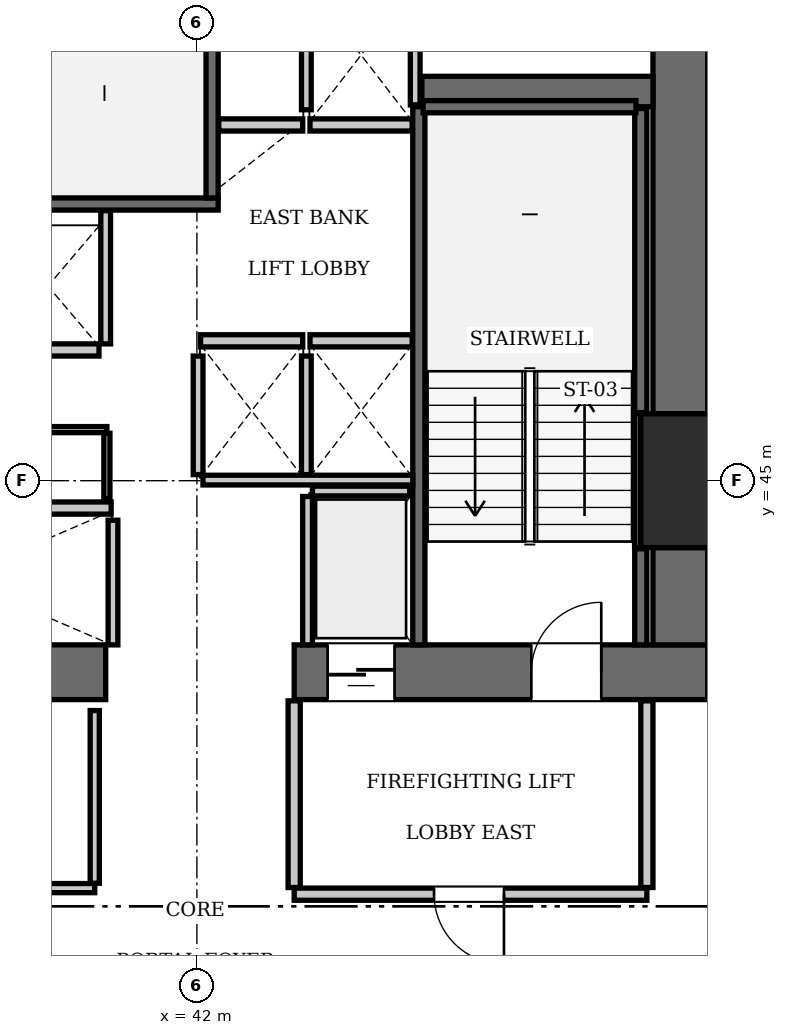
"""IFC4 building model, lengths in metres.
Left out: names, types, materials, properties, quantities, classifications, styles, units other than length and angle.
Written with IfcOpenShell. Run it as: python <this file> out.ifc"""

import sys

from ifc_helpers import new_model, si_unit, direction, frame, frame_2d, origin, origin_2d, place, context, subcontext, project, spatial, rectangle, extrude, element, fill, save


model = new_model("IFC4")
c1 = context("Model", 3, precision=1e-05, world=origin(), true_north=direction((0.0, 1.0)))
c2 = subcontext(c1, "Body", "Model", "MODEL_VIEW")
j1 = project(units=[si_unit("LENGTHUNIT", "METRE"), si_unit("PLANEANGLEUNIT", "RADIAN")], contexts=[c1])
p1 = place(None, origin())
s1 = spatial("IfcSite", under=j1, at=p1, CompositionType="ELEMENT")
p2 = place(p1, origin())
s2 = spatial("IfcBuilding", under=s1, at=p2, CompositionType="ELEMENT")
p3 = place(p2, frame((0.0, 0.0, 30.8)))
s3 = spatial("IfcBuildingStorey", under=s2, at=p3, CompositionType="ELEMENT", Elevation=30.8)
p4 = place(p3, frame((50.4, 45.0, 0.0), z_axis=(0.0, 0.0, 1.0), x_axis=(1.0, 0.0, 0.0)))
e1 = element("IfcColumn", 1, at=p4, inside=s3, PredefinedType="COLUMN", context=c2, shape_type="SweptSolid", body=[
    extrude(rectangle(XDim=2.2, YDim=2.2, at=origin_2d()), origin(), (0.0, 0.0, 1.0), 3.85),
])
p5 = place(p3, frame((35.1, 41.85, 0.0), z_axis=(0.0, 0.0, 1.0), x_axis=(1.0, 0.0, 0.0)))
e2 = element("IfcWall", 2, at=p5, inside=s3, PredefinedType="SHEAR", context=c2, shape_type="SweptSolid", body=[
    extrude(rectangle(XDim=5.4, YDim=0.9, at=frame_2d((2.7, 0.0))), origin(), (0.0, 0.0, 1.0), 3.85),
])
p6 = place(p3, frame((43.6, 41.85, 0.0), z_axis=(0.0, 0.0, 1.0), x_axis=(1.0, 0.0, 0.0)))
e3 = element("IfcWall", 3, at=p6, inside=s3, PredefinedType="SHEAR", context=c2, shape_type="SweptSolid", body=[
    extrude(rectangle(XDim=6.8, YDim=0.9, at=frame_2d((3.4, 0.0))), origin(), (0.0, 0.0, 1.0), 3.85),
])
p7 = place(p6, frame((3.9, 0.0, 0.0)))
e4 = element("IfcOpeningElement", 4, at=p7, cuts=e3, PredefinedType="OPENING", context=c2, shape_type="SweptSolid", body=[
    extrude(rectangle(XDim=1.15, YDim=2.15, at=frame_2d((0.575, 1.075))), frame((0.0, 0.46, 0.0), z_axis=(0.0, -1.0, 0.0), x_axis=(1.0, 0.0, 0.0)), (0.0, 0.0, 1.0), 0.92),
])
p8 = place(p6, frame((0.55, 0.0, 0.0)))
e5 = element("IfcOpeningElement", 5, at=p8, cuts=e3, PredefinedType="OPENING", context=c2, shape_type="SweptSolid", body=[
    extrude(rectangle(XDim=1.1, YDim=2.2, at=frame_2d((0.55, 1.1))), frame((0.0, 0.46, 0.0), z_axis=(0.0, -1.0, 0.0), x_axis=(1.0, 0.0, 0.0)), (0.0, 0.0, 1.0), 0.92),
])
p9 = place(p3, frame((49.95, 42.3, 0.0), z_axis=(0.0, 0.0, 1.0), x_axis=(0.0, 1.0, 0.0)))
e6 = element("IfcWall", 6, at=p9, inside=s3, PredefinedType="SHEAR", context=c2, shape_type="SweptSolid", body=[
    extrude(rectangle(XDim=1.6, YDim=0.9, at=frame_2d((0.8, 0.0))), origin(), (0.0, 0.0, 1.0), 3.85),
])
p10 = place(p3, frame((49.95, 46.1, 0.0), z_axis=(0.0, 0.0, 1.0), x_axis=(0.0, 1.0, 0.0)))
e7 = element("IfcWall", 7, at=p10, inside=s3, PredefinedType="SHEAR", context=c2, shape_type="SweptSolid", body=[
    extrude(rectangle(XDim=7.0, YDim=0.9, at=frame_2d((3.5, 0.0))), origin(), (0.0, 0.0, 1.0), 3.85),
])
p11 = place(p3, frame((45.7, 51.4, 0.0), z_axis=(0.0, 0.0, 1.0), x_axis=(1.0, 0.0, 0.0)))
e8 = element("IfcWall", 8, at=p11, inside=s3, PredefinedType="SHEAR", context=c2, shape_type="SweptSolid", body=[
    extrude(rectangle(XDim=3.8, YDim=0.5, at=frame_2d((1.9, 0.0))), origin(), (0.0, 0.0, 1.0), 3.85),
])
p12 = place(p3, frame((33.25, 49.55, 0.0), z_axis=(0.0, 0.0, 1.0), x_axis=(1.0, 0.0, 0.0)))
e9 = element("IfcWall", 9, at=p12, inside=s3, PredefinedType="SOLIDWALL", context=c2, shape_type="SweptSolid", body=[
    extrude(rectangle(XDim=9.1, YDim=0.2, at=frame_2d((4.55, 0.0))), origin(), (0.0, 0.0, 1.0), 3.61),
])
p13 = place(p3, frame((42.25, 49.65, 0.0), z_axis=(0.0, 0.0, 1.0), x_axis=(0.0, 1.0, 0.0)))
e10 = element("IfcWall", 10, at=p13, inside=s3, PredefinedType="SOLIDWALL", context=c2, shape_type="SweptSolid", body=[
    extrude(rectangle(XDim=3.45, YDim=0.2, at=frame_2d((1.725, 0.0))), origin(), (0.0, 0.0, 1.0), 3.61),
])
p14 = place(p3, frame((45.65, 42.3, 0.0), z_axis=(0.0, 0.0, 1.0), x_axis=(0.0, 1.0, 0.0)))
e11 = element("IfcWall", 11, at=p14, inside=s3, PredefinedType="SOLIDWALL", context=c2, shape_type="SweptSolid", body=[
    extrude(rectangle(XDim=8.85, YDim=0.2, at=frame_2d((4.425, 0.0))), origin(), (0.0, 0.0, 1.0), 3.61),
])
p15 = place(p3, frame((49.3, 42.3, 0.0), z_axis=(0.0, 0.0, 1.0), x_axis=(0.0, 1.0, 0.0)))
e12 = element("IfcWall", 12, at=p15, inside=s3, PredefinedType="SOLIDWALL", context=c2, shape_type="SweptSolid", body=[
    extrude(rectangle(XDim=1.58, YDim=0.2, at=frame_2d((0.79, 0.0))), origin(), (0.0, 0.0, 1.0), 3.61),
])
p16 = place(p3, frame((49.3, 46.12, 0.0), z_axis=(0.0, 0.0, 1.0), x_axis=(0.0, 1.0, 0.0)))
e13 = element("IfcWall", 13, at=p16, inside=s3, PredefinedType="SOLIDWALL", context=c2, shape_type="SweptSolid", body=[
    extrude(rectangle(XDim=5.0, YDim=0.2, at=frame_2d((2.5, 0.0))), origin(), (0.0, 0.0, 1.0), 3.61),
])
p17 = place(p3, frame((45.72, 51.15, 0.0), z_axis=(0.0, 0.0, 1.0), x_axis=(1.0, 0.0, 0.0)))
e14 = element("IfcWall", 14, at=p17, inside=s3, PredefinedType="SOLIDWALL", context=c2, shape_type="SweptSolid", body=[
    extrude(rectangle(XDim=3.5, YDim=0.2, at=frame_2d((1.75, 0.0))), origin(), (0.0, 0.0, 1.0), 3.61),
])
p18 = place(p3, frame((49.248, 43.9, 0.0), z_axis=(0.0, 0.0, 1.0), x_axis=(0.0, 1.0, 0.0)))
e15 = element("IfcWall", 15, at=p18, inside=s3, PredefinedType="SOLIDWALL", context=c2, shape_type="SweptSolid", body=[
    extrude(rectangle(XDim=2.2, YDim=0.1, at=frame_2d((1.1, 0.0))), origin(), (0.0, 0.0, 1.0), 3.61),
])
for number, where, z_axis, x_axis in (
    (16, (42.06, 47.3, 0.0), (0.0, 0.0, 1.0), (1.0, 0.0, 0.0)),
    (17, (43.86, 47.3, 0.0), (0.0, 0.0, 1.0), (1.0, 0.0, 0.0)),
):
    element("IfcWall", number, at=place(p3, frame(where, z_axis=z_axis, x_axis=x_axis)), inside=s3, PredefinedType="SOLIDWALL", context=c2, shape_type="SweptSolid", body=[
        extrude(rectangle(XDim=1.68, YDim=0.2, at=frame_2d((0.84, 0.0))), origin(), (0.0, 0.0, 1.0), 3.61),
    ])
p19 = place(p3, frame((42.36, 50.85, 0.0), z_axis=(0.0, 0.0, 1.0), x_axis=(1.0, 0.0, 0.0)))
e18 = element("IfcWall", 18, at=p19, inside=s3, PredefinedType="SOLIDWALL", context=c2, shape_type="SweptSolid", body=[
    extrude(rectangle(XDim=1.38, YDim=0.2, at=frame_2d((0.69, 0.0))), origin(), (0.0, 0.0, 1.0), 3.61),
])
p20 = place(p3, frame((43.86, 50.85, 0.0), z_axis=(0.0, 0.0, 1.0), x_axis=(1.0, 0.0, 0.0)))
e19 = element("IfcWall", 19, at=p20, inside=s3, PredefinedType="SOLIDWALL", context=c2, shape_type="SweptSolid", body=[
    extrude(rectangle(XDim=1.68, YDim=0.2, at=frame_2d((0.84, 0.0))), origin(), (0.0, 0.0, 1.0), 3.61),
])
p21 = place(p3, frame((38.91, 44.55, 0.0), z_axis=(0.0, 0.0, 1.0), x_axis=(1.0, 0.0, 0.0)))
e20 = element("IfcWall", 20, at=p21, inside=s3, PredefinedType="SOLIDWALL", context=c2, shape_type="SweptSolid", body=[
    extrude(rectangle(XDim=1.68, YDim=0.2, at=frame_2d((0.84, 0.0))), origin(), (0.0, 0.0, 1.0), 3.61),
])
p22 = place(p3, frame((38.71, 47.15, 0.0), z_axis=(0.0, 0.0, 1.0), x_axis=(1.0, 0.0, 0.0)))
e21 = element("IfcWall", 21, at=p22, inside=s3, PredefinedType="SOLIDWALL", context=c2, shape_type="SweptSolid", body=[
    extrude(rectangle(XDim=1.68, YDim=0.2, at=frame_2d((0.84, 0.0))), origin(), (0.0, 0.0, 1.0), 3.61),
])
p23 = place(p3, frame((43.9, 44.83, 0.0), z_axis=(0.0, 0.0, 1.0), x_axis=(1.0, 0.0, 0.0)))
e22 = element("IfcWall", 22, at=p23, inside=s3, PredefinedType="SOLIDWALL", context=c2, shape_type="SweptSolid", body=[
    extrude(rectangle(XDim=1.6, YDim=0.16, at=frame_2d((0.8, 0.0))), origin(), (0.0, 0.0, 1.0), 3.61),
])
p24 = place(p3, frame((43.82, 42.3, 0.0), z_axis=(0.0, 0.0, 1.0), x_axis=(0.0, 1.0, 0.0)))
e23 = element("IfcWall", 23, at=p24, inside=s3, PredefinedType="SOLIDWALL", context=c2, shape_type="SweptSolid", body=[
    extrude(rectangle(XDim=2.44, YDim=0.16, at=frame_2d((1.22, 0.0))), origin(), (0.0, 0.0, 1.0), 3.61),
])
for number, where, z_axis, x_axis in (
    (24, (42.02, 45.1, 0.0), (0.0, 0.0, 1.0), (0.0, 1.0, 0.0)),
    (25, (43.8, 45.1, 0.0), (0.0, 0.0, 1.0), (0.0, 1.0, 0.0)),
):
    element("IfcWall", number, at=place(p3, frame(where, z_axis=z_axis, x_axis=x_axis)), inside=s3, PredefinedType="SOLIDWALL", context=c2, shape_type="SweptSolid", body=[
        extrude(rectangle(XDim=1.95, YDim=0.16, at=frame_2d((0.975, 0.0))), origin(), (0.0, 0.0, 1.0), 3.61),
    ])
p25 = place(p3, frame((42.1, 45.01, 0.0), z_axis=(0.0, 0.0, 1.0), x_axis=(1.0, 0.0, 0.0)))
e26 = element("IfcWall", 26, at=p25, inside=s3, PredefinedType="SOLIDWALL", context=c2, shape_type="SweptSolid", body=[
    extrude(rectangle(XDim=3.45, YDim=0.16, at=frame_2d((1.725, 0.0))), origin(), (0.0, 0.0, 1.0), 3.61),
])
p26 = place(p3, frame((45.59, 51.18, 0.0), z_axis=(0.0, 0.0, 1.0), x_axis=(0.0, 1.0, 0.0)))
e27 = element("IfcWall", 27, at=p26, inside=s3, PredefinedType="SOLIDWALL", context=c2, shape_type="SweptSolid", body=[
    extrude(rectangle(XDim=1.92, YDim=0.16, at=frame_2d((0.96, 0.0))), origin(), (0.0, 0.0, 1.0), 3.61),
])
p27 = place(p3, frame((43.8, 51.1, 0.0), z_axis=(0.0, 0.0, 1.0), x_axis=(0.0, 1.0, 0.0)))
e28 = element("IfcWall", 28, at=p27, inside=s3, PredefinedType="SOLIDWALL", context=c2, shape_type="SweptSolid", body=[
    extrude(rectangle(XDim=2.0, YDim=0.16, at=frame_2d((1.0, 0.0))), origin(), (0.0, 0.0, 1.0), 3.61),
])
p28 = place(p3, frame((40.62, 42.3, 0.0), z_axis=(0.0, 0.0, 1.0), x_axis=(0.0, 1.0, 0.0)))
e29 = element("IfcWall", 29, at=p28, inside=s3, PredefinedType="SOLIDWALL", context=c2, shape_type="SweptSolid", body=[
    extrude(rectangle(XDim=2.05, YDim=0.16, at=frame_2d((1.025, 0.0))), origin(), (0.0, 0.0, 1.0), 3.61),
])
p29 = place(p3, frame((40.5, 47.25, 0.0), z_axis=(0.0, 0.0, 1.0), x_axis=(0.0, 1.0, 0.0)))
e30 = element("IfcWall", 30, at=p29, inside=s3, PredefinedType="SOLIDWALL", context=c2, shape_type="SweptSolid", body=[
    extrude(rectangle(XDim=2.19, YDim=0.16, at=frame_2d((1.095, 0.0))), origin(), (0.0, 0.0, 1.0), 3.61),
])
p30 = place(p3, frame((43.6, 38.2, 0.0), z_axis=(0.0, 0.0, 1.0), x_axis=(1.0, 0.0, 0.0)))
e31 = element("IfcWall", 31, at=p30, inside=s3, PredefinedType="PARTITIONING", context=c2, shape_type="SweptSolid", body=[
    extrude(rectangle(XDim=5.8, YDim=0.2, at=frame_2d((2.9, 0.0))), origin(), (0.0, 0.0, 1.0), 3.61),
])
p31 = place(p30, frame((2.3, 0.0, 0.0)))
e32 = element("IfcOpeningElement", 32, at=p31, cuts=e31, PredefinedType="OPENING", context=c2, shape_type="SweptSolid", body=[
    extrude(rectangle(XDim=1.15, YDim=2.15, at=frame_2d((0.575, 1.075))), frame((0.0, 0.11, 0.0), z_axis=(0.0, -1.0, 0.0), x_axis=(1.0, 0.0, 0.0)), (0.0, 0.0, 1.0), 0.22),
])
for number, where, z_axis, x_axis in (
    (33, (43.6, 38.31, 0.0), (0.0, 0.0, 1.0), (0.0, 1.0, 0.0)),
    (34, (49.4, 38.31, 0.0), (0.0, 0.0, 1.0), (0.0, 1.0, 0.0)),
):
    element("IfcWall", number, at=place(p3, frame(where, z_axis=z_axis, x_axis=x_axis)), inside=s3, PredefinedType="PARTITIONING", context=c2, shape_type="SweptSolid", body=[
        extrude(rectangle(XDim=3.07, YDim=0.2, at=frame_2d((1.535, 0.0))), origin(), (0.0, 0.0, 1.0), 3.61),
    ])
p32 = place(p3, frame((35.58, 45.84, 0.0), z_axis=(0.0, 0.0, 1.0), x_axis=(1.0, 0.0, 0.0)))
e35 = element("IfcWall", 35, at=p32, inside=s3, PredefinedType="PARTITIONING", context=c2, shape_type="SweptSolid", body=[
    extrude(rectangle(XDim=4.94, YDim=0.1, at=frame_2d((2.47, 0.0))), origin(), (0.0, 0.0, 1.0), 3.61),
])
p33 = place(p32, frame((1.8, 0.0, 0.0)))
e36 = element("IfcOpeningElement", 36, at=p33, cuts=e35, PredefinedType="OPENING", context=c2, shape_type="SweptSolid", body=[
    extrude(rectangle(XDim=0.8, YDim=2.05, at=frame_2d((0.4, 1.025))), frame((0.0, 0.06, 0.0), z_axis=(0.0, -1.0, 0.0), x_axis=(1.0, 0.0, 0.0)), (0.0, 0.0, 1.0), 0.12),
])
p34 = place(p3, frame((40.52, 44.7, 0.0), z_axis=(0.0, 0.0, 1.0), x_axis=(0.0, 1.0, 0.0)))
e37 = element("IfcWall", 37, at=p34, inside=s3, PredefinedType="PARTITIONING", context=c2, shape_type="SweptSolid", body=[
    extrude(rectangle(XDim=1.08, YDim=0.1, at=frame_2d((0.54, 0.0))), origin(), (0.0, 0.0, 1.0), 3.61),
])
p35 = place(p3, frame((34.4, 38.3, 0.0), z_axis=(0.0, 0.0, 1.0), x_axis=(1.0, 0.0, 0.0)))
e38 = element("IfcWall", 38, at=p35, inside=s3, PredefinedType="PARTITIONING", context=c2, shape_type="SweptSolid", body=[
    extrude(rectangle(XDim=5.92, YDim=0.15, at=frame_2d((2.96, 0.0))), origin(), (0.0, 0.0, 1.0), 3.61),
])
p36 = place(p35, frame((2.4, 0.0, 0.0)))
e39 = element("IfcOpeningElement", 39, at=p36, cuts=e38, PredefinedType="OPENING", context=c2, shape_type="SweptSolid", body=[
    extrude(rectangle(XDim=0.9, YDim=2.1, at=frame_2d((0.45, 1.05))), frame((0.0, 0.085, 0.0), z_axis=(0.0, -1.0, 0.0), x_axis=(1.0, 0.0, 0.0)), (0.0, 0.0, 1.0), 0.17),
])
p37 = place(p3, frame((40.32, 38.38, 0.0), z_axis=(0.0, 0.0, 1.0), x_axis=(0.0, 1.0, 0.0)))
e40 = element("IfcWall", 40, at=p37, inside=s3, PredefinedType="PARTITIONING", context=c2, shape_type="SweptSolid", body=[
    extrude(rectangle(XDim=2.84, YDim=0.15, at=frame_2d((1.42, 0.0))), origin(), (0.0, 0.0, 1.0), 3.61),
])
p38 = place(p7, origin())
e41 = element("IfcDoor", 41, at=p38, inside=s3, OperationType="SINGLE_SWING_RIGHT", PredefinedType="DOOR", context=c2, shape_type="SweptSolid", body=[
    extrude(rectangle(XDim=1.15, YDim=2.15, at=frame_2d((0.575, 1.075))), frame((0.0, 0.025, 0.0), z_axis=(0.0, -1.0, 0.0), x_axis=(1.0, 0.0, 0.0)), (0.0, 0.0, 1.0), 0.05),
])
fill(e4, e41)
p39 = place(p8, frame((1.1, 0.0, 0.0), z_axis=(0.0, 0.0, 1.0), x_axis=(-1.0, 0.0, 0.0)))
e42 = element("IfcDoor", 42, at=p39, inside=s3, OperationType="SLIDING_TO_LEFT", PredefinedType="DOOR", context=c2, shape_type="SweptSolid", body=[
    extrude(rectangle(XDim=1.1, YDim=2.2, at=frame_2d((0.55, 1.1))), frame((0.0, 0.025, 0.0), z_axis=(0.0, -1.0, 0.0), x_axis=(1.0, 0.0, 0.0)), (0.0, 0.0, 1.0), 0.05),
])
fill(e5, e42)
p40 = place(p31, frame((1.15, 0.0, 0.0), z_axis=(0.0, 0.0, 1.0), x_axis=(-1.0, 0.0, 0.0)))
e43 = element("IfcDoor", 43, at=p40, inside=s3, OperationType="SINGLE_SWING_LEFT", PredefinedType="DOOR", context=c2, shape_type="SweptSolid", body=[
    extrude(rectangle(XDim=1.15, YDim=2.15, at=frame_2d((0.575, 1.075))), frame((0.0, 0.025, 0.0), z_axis=(0.0, -1.0, 0.0), x_axis=(1.0, 0.0, 0.0)), (0.0, 0.0, 1.0), 0.05),
])
fill(e32, e43)
save(model, sys.argv[1])
